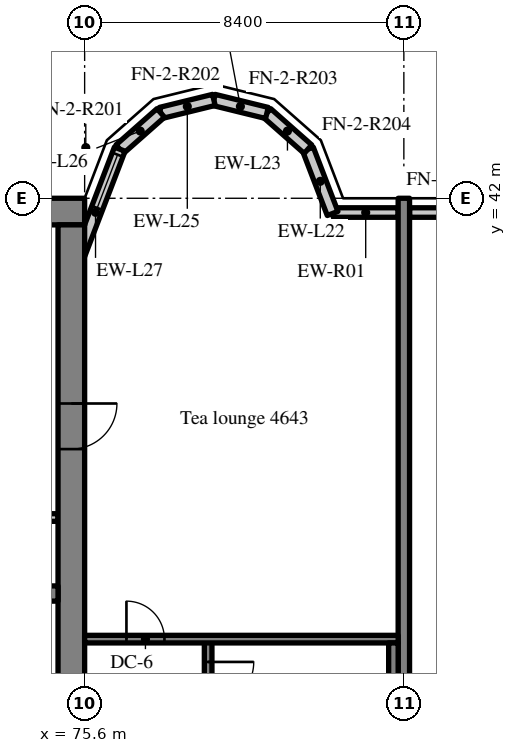
"""IFC4 building model, lengths in metres.
Left out: names, types, materials, properties, quantities, classifications, styles, units other than length and angle.
Written with IfcOpenShell. Run it as: python <this file> out.ifc"""

import sys

from ifc_helpers import new_model, si_unit, direction, frame, frame_2d, origin, place, context, subcontext, project, spatial, rectangle, extrude, source, transform, mapped, element, fill, save


model = new_model("IFC4")
c1 = context("Model", 3, precision=1e-05, world=origin(), true_north=direction((0.0, 1.0)))
c2 = subcontext(c1, "Body", "Model", "MODEL_VIEW")
j1 = project(units=[si_unit("LENGTHUNIT", "METRE"), si_unit("PLANEANGLEUNIT", "RADIAN")], contexts=[c1])
p1 = place(None, origin())
s1 = spatial("IfcSite", under=j1, at=p1, CompositionType="ELEMENT")
p2 = place(p1, origin())
s2 = spatial("IfcBuilding", under=s1, at=p2, CompositionType="ELEMENT")
p3 = place(p2, frame((0.0, 0.0, 189.6)))
s3 = spatial("IfcBuildingStorey", under=s2, at=p3, CompositionType="ELEMENT", Elevation=189.6)
m1 = source(origin(), c2, "Body", "SweptSolid", [
    extrude(rectangle(XDim=50.4, YDim=0.7, at=frame_2d((25.2, 0.0))), origin(), (0.0, 0.0, 1.0), 3.52),
])
p4 = place(p3, frame((25.2, 41.65, 0.0), z_axis=(0.0, 0.0, 1.0), x_axis=(1.0, 0.0, 0.0)))
e1 = element("IfcWall", 1, at=p4, inside=s3, PredefinedType="SHEAR", context=c2, shape_type="MappedRepresentation", body=[
    mapped(m1, transform((0.0, 0.0, 0.0), scale=1.0)),
])
m2 = source(origin(), c2, "Body", "SweptSolid", [
    extrude(rectangle(XDim=18.6, YDim=0.7, at=frame_2d((9.3, 0.0))), origin(), (0.0, 0.0, 1.0), 3.52),
])
p5 = place(p3, frame((75.25, 22.7, 0.0), z_axis=(0.0, 0.0, 1.0), x_axis=(0.0, 1.0, 0.0)))
e2 = element("IfcWall", 2, at=p5, inside=s3, PredefinedType="SHEAR", context=c2, shape_type="MappedRepresentation", body=[
    mapped(m2, transform((0.0, 0.0, 0.0), scale=1.0)),
])
m3 = source(origin(), c2, "Body", "SweptSolid", [
    extrude(rectangle(XDim=1.2, YDim=2.1, at=frame_2d((0.6, 1.05))), frame((0.0, 0.36, 0.0), z_axis=(0.0, -1.0, 0.0), x_axis=(1.0, 0.0, 0.0)), (0.0, 0.0, 1.0), 0.72),
])
p6 = place(p5, frame((12.7, 0.0, 0.0)))
e3 = element("IfcOpeningElement", 3, at=p6, cuts=e2, PredefinedType="OPENING", context=c2, shape_type="MappedRepresentation", body=[
    mapped(m3, transform((0.0, 0.0, 0.0), scale=1.0)),
])
m4 = source(origin(), c2, "Body", "SweptSolid", [
    extrude(rectangle(XDim=7.5, YDim=0.4, at=frame_2d((3.75, 0.0))), origin(), (0.0, 0.0, 1.0), 3.52),
])
p7 = place(p3, frame((67.4, 31.6, 0.0), z_axis=(0.0, 0.0, 1.0), x_axis=(1.0, 0.0, 0.0)))
e4 = element("IfcWall", 4, at=p7, inside=s3, PredefinedType="SHEAR", context=c2, shape_type="MappedRepresentation", body=[
    mapped(m4, transform((0.0, 0.0, 0.0), scale=1.0)),
])
m5 = source(origin(), c2, "Body", "SweptSolid", [
    extrude(rectangle(XDim=1.1, YDim=2.1, at=frame_2d((0.55, 1.05))), frame((0.0, 0.21, 0.0), z_axis=(0.0, -1.0, 0.0), x_axis=(1.0, 0.0, 0.0)), (0.0, 0.0, 1.0), 0.42),
])
p8 = place(p7, frame((5.725, 0.0, 0.0)))
e5 = element("IfcOpeningElement", 5, at=p8, cuts=e4, PredefinedType="OPENING", context=c2, shape_type="MappedRepresentation", body=[
    mapped(m5, transform((0.0, 0.0, 0.0), scale=1.0)),
])
m6 = source(origin(), c2, "Body", "SweptSolid", [
    extrude(rectangle(XDim=20.0, YDim=0.3, at=frame_2d((10.0, 0.0))), origin(), (0.0, 0.0, 1.0), 3.52),
])
p9 = place(p3, frame((84.0, 22.0, 0.0), z_axis=(0.0, 0.0, 1.0), x_axis=(0.0, 1.0, 0.0)))
e6 = element("IfcWall", 6, at=p9, inside=s3, PredefinedType="SHEAR", context=c2, shape_type="MappedRepresentation", body=[
    mapped(m6, transform((0.0, 0.0, 0.0), scale=1.0)),
])
m7 = source(origin(), c2, "Body", "SweptSolid", [
    extrude(rectangle(XDim=1.708, YDim=0.25, at=frame_2d((0.854, 0.0))), origin(), (0.0, 0.0, 1.0), 2.87),
])
p10 = place(p3, frame((83.85, 41.625, 0.0), z_axis=(0.0, 0.0, 1.0), x_axis=(-1.0, 0.0, 0.0)))
e7 = element("IfcWall", 7, at=p10, inside=s3, PredefinedType="SOLIDWALL", context=c2, shape_type="MappedRepresentation", body=[
    mapped(m7, transform((0.0, 0.0, 0.0), scale=1.0)),
])
m8 = source(origin(), c2, "Body", "SweptSolid", [
    extrude(rectangle(XDim=4.095, YDim=0.25, at=frame_2d((2.047, 0.0))), origin(), (0.0, 0.0, 1.0), 2.87),
])
p11 = place(p3, frame((88.245, 41.625, 0.0), z_axis=(0.0, 0.0, 1.0), x_axis=(-1.0, 0.0, 0.0)))
e8 = element("IfcWall", 8, at=p11, inside=s3, PredefinedType="SOLIDWALL", context=c2, shape_type="MappedRepresentation", body=[
    mapped(m8, transform((0.0, 0.0, 0.0), scale=1.0)),
])
m9 = source(origin(), c2, "Body", "SweptSolid", [
    extrude(rectangle(XDim=1.5, YDim=1.5, at=frame_2d((0.75, 0.75))), frame((0.0, 0.135, 0.0), z_axis=(0.0, -1.0, 0.0), x_axis=(1.0, 0.0, 0.0)), (0.0, 0.0, 1.0), 0.27),
])
p12 = place(p11, frame((1.297, 0.0, 0.9)))
e9 = element("IfcOpeningElement", 9, at=p12, cuts=e8, PredefinedType="OPENING", context=c2, shape_type="MappedRepresentation", body=[
    mapped(m9, transform((0.0, 0.0, 0.0), scale=1.0)),
])
m10 = source(origin(), c2, "Body", "SweptSolid", [
    extrude(rectangle(XDim=1.812, YDim=0.3, at=frame_2d((0.906, 0.0))), origin(), (0.0, 0.0, 1.0), 3.52),
])
p13 = place(p3, frame((82.125, 41.6, 0.0), z_axis=(0.0, 0.0, 1.0), x_axis=(-0.357877270961, 0.93376863244, 0.0)))
e10 = element("IfcWall", 10, at=p13, inside=s3, PredefinedType="SOLIDWALL", context=c2, shape_type="MappedRepresentation", body=[
    mapped(m10, transform((0.0, 0.0, 0.0), scale=1.0)),
])
m11 = source(origin(), c2, "Body", "SweptSolid", [
    extrude(rectangle(XDim=1.44, YDim=0.3, at=frame_2d((0.72, 0.0))), origin(), (0.0, 0.0, 1.0), 3.52),
])
p14 = place(p3, frame((81.477, 43.292, 0.0), z_axis=(0.0, 0.0, 1.0), x_axis=(-0.74957555648, 0.661918790432, 0.0)))
e11 = element("IfcWall", 11, at=p14, inside=s3, PredefinedType="SOLIDWALL", context=c2, shape_type="MappedRepresentation", body=[
    mapped(m11, transform((0.0, 0.0, 0.0), scale=1.0)),
])
m12 = source(origin(), c2, "Body", "SweptSolid", [
    extrude(rectangle(XDim=1.439, YDim=0.3, at=frame_2d((0.719, 0.0))), origin(), (0.0, 0.0, 1.0), 3.52),
])
for number, where, z_axis, x_axis in (
    (12, (80.397, 44.245, 0.0), (0.0, 0.0, 1.0), (-0.971, 0.238, 0.0)),
    (13, (79.0, 44.588, 0.0), (0.0, 0.0, 1.0), (-0.971, -0.238, 0.0)),
):
    element("IfcWall", number, at=place(p3, frame(where, z_axis=z_axis, x_axis=x_axis)), inside=s3, PredefinedType="SOLIDWALL", context=c2, shape_type="MappedRepresentation", body=[
        mapped(m12, transform((0.0, 0.0, 0.0), scale=1.0)),
    ])
p15 = place(p3, frame((77.603, 44.245, 0.0), z_axis=(0.0, 0.0, 1.0), x_axis=(-0.74957555648, -0.661918790432, 0.0)))
e14 = element("IfcWall", 14, at=p15, inside=s3, PredefinedType="SOLIDWALL", context=c2, shape_type="MappedRepresentation", body=[
    mapped(m11, transform((0.0, 0.0, 0.0), scale=1.0)),
])
m13 = source(origin(), c2, "Body", "SweptSolid", [
    extrude(rectangle(XDim=3.559, YDim=0.3, at=frame_2d((1.78, 0.0))), origin(), (0.0, 0.0, 1.0), 3.52),
])
p16 = place(p3, frame((76.523, 43.292, 0.0), z_axis=(0.0, 0.0, 1.0), x_axis=(-0.35779745313, -0.933799219604, 0.0)))
e15 = element("IfcWall", 15, at=p16, inside=s3, PredefinedType="SOLIDWALL", context=c2, shape_type="MappedRepresentation", body=[
    mapped(m13, transform((0.0, 0.0, 0.0), scale=1.0)),
])
m14 = source(origin(), c2, "Body", "SweptSolid", [
    extrude(rectangle(XDim=1.5, YDim=2.0, at=frame_2d((0.75, 1.0))), frame((0.0, 0.16, 0.0), z_axis=(0.0, -1.0, 0.0), x_axis=(1.0, 0.0, 0.0)), (0.0, 0.0, 1.0), 0.32),
])
p17 = place(p16, frame((0.156, 0.0, 0.9)))
e16 = element("IfcOpeningElement", 16, at=p17, cuts=e15, PredefinedType="OPENING", context=c2, shape_type="MappedRepresentation", body=[
    mapped(m14, transform((0.0, 0.0, 0.0), scale=1.0)),
])
m15 = source(origin(), c2, "Body", "SweptSolid", [
    extrude(rectangle(XDim=2.45, YDim=0.2, at=frame_2d((1.225, 0.0))), origin(), (0.0, 0.0, 1.0), 3.52),
])
p18 = place(p3, frame((72.45, 33.6, 0.0), z_axis=(0.0, 0.0, 1.0), x_axis=(1.0, 0.0, 0.0)))
e17 = element("IfcWall", 17, at=p18, inside=s3, PredefinedType="SOLIDWALL", context=c2, shape_type="MappedRepresentation", body=[
    mapped(m15, transform((0.0, 0.0, 0.0), scale=1.0)),
])
m16 = source(origin(), c2, "Body", "SweptSolid", [
    extrude(rectangle(XDim=8.3, YDim=0.2, at=frame_2d((4.15, 0.0))), origin(), (0.0, 0.0, 1.0), 3.52),
])
p19 = place(p3, frame((78.85, 22.1, 0.0), z_axis=(0.0, 0.0, 1.0), x_axis=(0.0, 1.0, 0.0)))
e18 = element("IfcWall", 18, at=p19, inside=s3, PredefinedType="SOLIDWALL", context=c2, shape_type="MappedRepresentation", body=[
    mapped(m16, transform((0.0, 0.0, 0.0), scale=1.0)),
])
m17 = source(origin(), c2, "Body", "SweptSolid", [
    extrude(rectangle(XDim=1.2, YDim=2.1, at=frame_2d((0.6, 1.05))), frame((0.0, 0.11, 0.0), z_axis=(0.0, -1.0, 0.0), x_axis=(1.0, 0.0, 0.0)), (0.0, 0.0, 1.0), 0.22),
])
p20 = place(p19, frame((6.5, 0.0, 0.0)))
e19 = element("IfcOpeningElement", 19, at=p20, cuts=e18, PredefinedType="OPENING", context=c2, shape_type="MappedRepresentation", body=[
    mapped(m17, transform((0.0, 0.0, 0.0), scale=1.0)),
])
m18 = source(origin(), c2, "Body", "SweptSolid", [
    extrude(rectangle(XDim=8.25, YDim=0.2, at=frame_2d((4.125, 0.0))), origin(), (0.0, 0.0, 1.0), 3.52),
])
p21 = place(p3, frame((83.85, 30.4, 0.0), z_axis=(0.0, 0.0, 1.0), x_axis=(-1.0, 0.0, 0.0)))
e20 = element("IfcWall", 20, at=p21, inside=s3, PredefinedType="SOLIDWALL", context=c2, shape_type="MappedRepresentation", body=[
    mapped(m18, transform((0.0, 0.0, 0.0), scale=1.0)),
])
m19 = source(origin(), c2, "Body", "SweptSolid", [
    extrude(rectangle(XDim=1.0, YDim=2.1, at=frame_2d((0.5, 1.05))), frame((0.0, 0.11, 0.0), z_axis=(0.0, -1.0, 0.0), x_axis=(1.0, 0.0, 0.0)), (0.0, 0.0, 1.0), 0.22),
])
p22 = place(p21, frame((6.15, 0.0, 0.0)))
e21 = element("IfcOpeningElement", 21, at=p22, cuts=e20, PredefinedType="OPENING", context=c2, shape_type="MappedRepresentation", body=[
    mapped(m19, transform((0.0, 0.0, 0.0), scale=1.0)),
])
m20 = source(origin(), c2, "Body", "SweptSolid", [
    extrude(rectangle(XDim=8.1, YDim=0.25, at=frame_2d((4.05, 0.0))), origin(), (0.0, 0.0, 1.0), 3.52),
])
p23 = place(p3, frame((83.725, 22.2, 0.0), z_axis=(0.0, 0.0, 1.0), x_axis=(0.0, 1.0, 0.0)))
e22 = element("IfcWall", 22, at=p23, inside=s3, PredefinedType="SOLIDWALL", context=c2, shape_type="MappedRepresentation", body=[
    mapped(m20, transform((0.0, 0.0, 0.0), scale=1.0)),
])
m21 = source(origin(), c2, "Body", "SweptSolid", [
    extrude(rectangle(XDim=1.5, YDim=2.0, at=frame_2d((0.75, 1.0))), frame((0.0, 0.03, 0.0), z_axis=(0.0, -1.0, 0.0), x_axis=(1.0, 0.0, 0.0)), (0.0, 0.0, 1.0), 0.06),
])
p24 = place(p17, origin())
e23 = element("IfcWindow", 23, at=p24, inside=s3, PartitioningType="SINGLE_PANEL", PredefinedType="WINDOW", context=c2, shape_type="MappedRepresentation", body=[
    mapped(m21, transform((0.0, 0.0, 0.0), scale=1.0)),
])
fill(e16, e23)
m22 = source(origin(), c2, "Body", "SweptSolid", [
    extrude(rectangle(XDim=1.2, YDim=2.1, at=frame_2d((0.6, 1.05))), frame((0.0, 0.025, 0.0), z_axis=(0.0, -1.0, 0.0), x_axis=(1.0, 0.0, 0.0)), (0.0, 0.0, 1.0), 0.05),
])
p25 = place(p6, origin())
e24 = element("IfcDoor", 24, at=p25, inside=s3, OperationType="SINGLE_SWING_RIGHT", PredefinedType="DOOR", context=c2, shape_type="MappedRepresentation", body=[
    mapped(m22, transform((0.0, 0.0, 0.0), scale=1.0)),
])
fill(e3, e24)
p26 = place(p20, origin())
e25 = element("IfcDoor", 25, at=p26, inside=s3, OperationType="SINGLE_SWING_RIGHT", PredefinedType="DOOR", context=c2, shape_type="MappedRepresentation", body=[
    mapped(m22, transform((0.0, 0.0, 0.0), scale=1.0)),
])
fill(e19, e25)
m23 = source(origin(), c2, "Body", "SweptSolid", [
    extrude(rectangle(XDim=1.0, YDim=2.1, at=frame_2d((0.5, 1.05))), frame((0.0, 0.025, 0.0), z_axis=(0.0, -1.0, 0.0), x_axis=(1.0, 0.0, 0.0)), (0.0, 0.0, 1.0), 0.05),
])
p27 = place(p22, origin())
e26 = element("IfcDoor", 26, at=p27, inside=s3, OperationType="SINGLE_SWING_RIGHT", PredefinedType="DOOR", context=c2, shape_type="MappedRepresentation", body=[
    mapped(m23, transform((0.0, 0.0, 0.0), scale=1.0)),
])
fill(e21, e26)
save(model, sys.argv[1])
